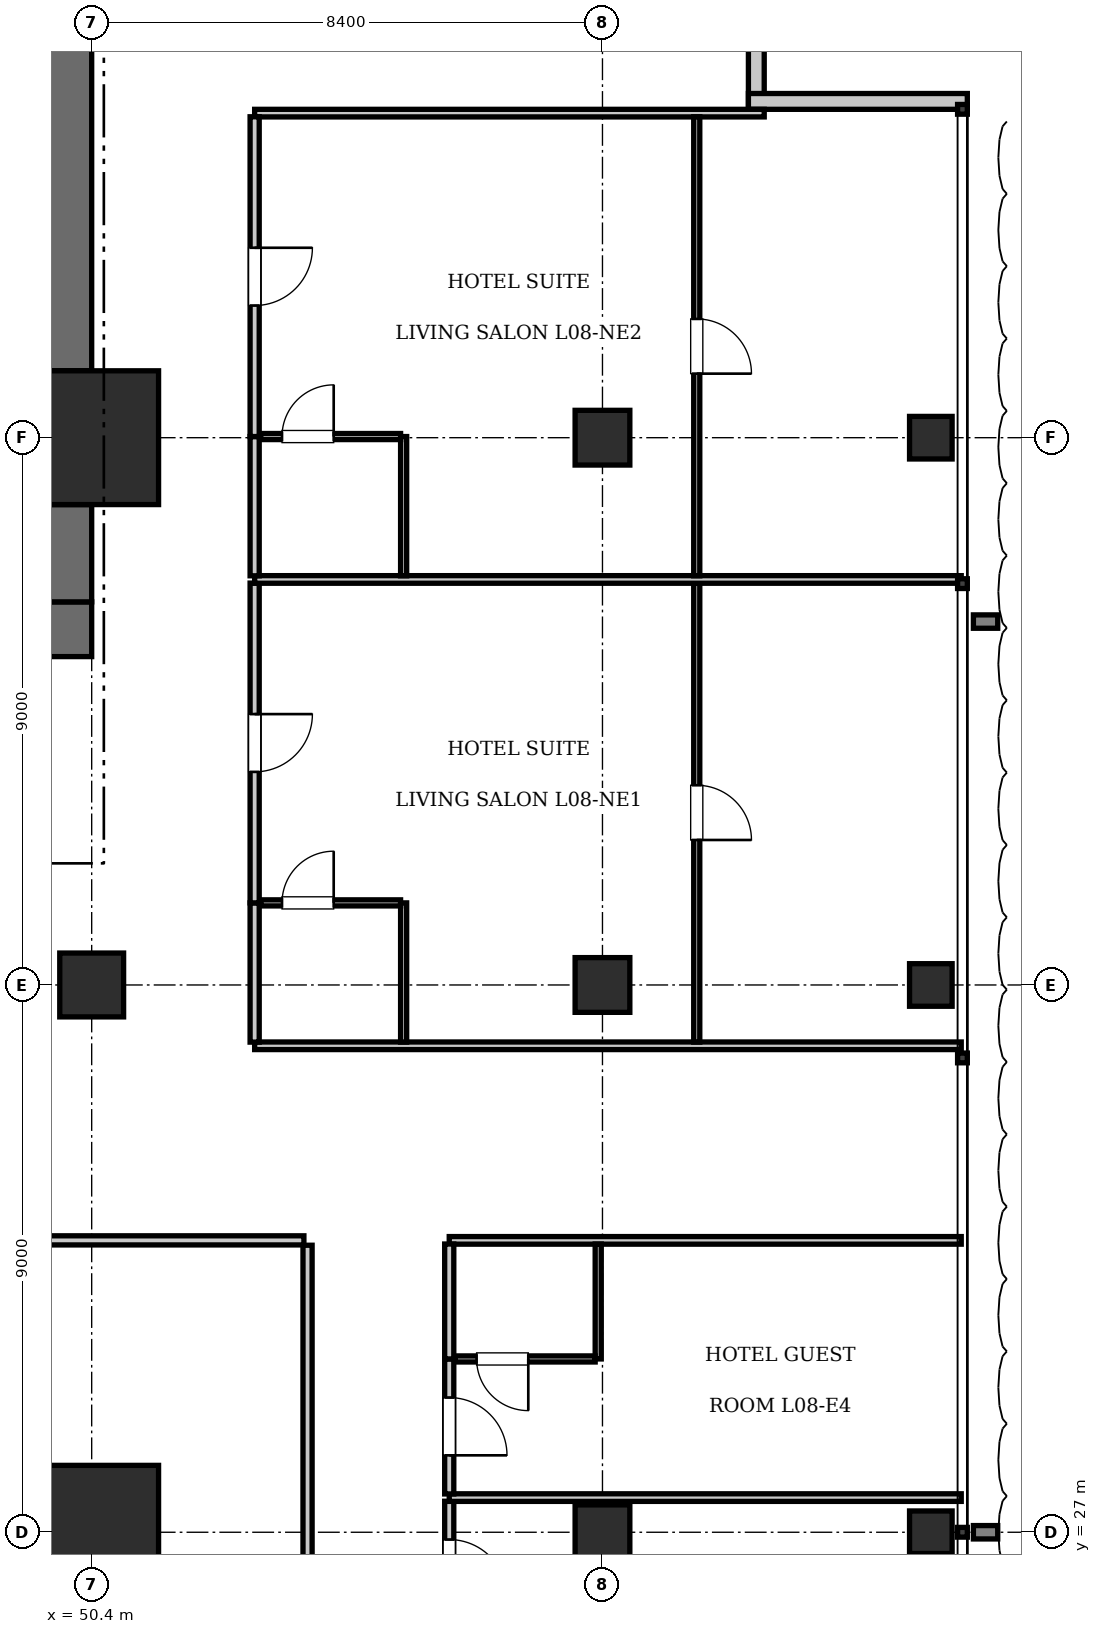
"""IFC4 building model, lengths in metres.
Left out: names, types, materials, properties, quantities, classifications, styles, units other than length and angle.
Written with IfcOpenShell. Run it as: python <this file> out.ifc"""

import sys

from ifc_helpers import new_model, si_unit, direction, frame, frame_2d, origin, origin_2d, place, context, subcontext, project, spatial, rectangle, i_section, extrude, element, fill, save


model = new_model("IFC4")
c1 = context("Model", 3, precision=1e-05, world=origin(), true_north=direction((0.0, 1.0)))
c2 = subcontext(c1, "Body", "Model", "MODEL_VIEW")
j1 = project(units=[si_unit("LENGTHUNIT", "METRE"), si_unit("PLANEANGLEUNIT", "RADIAN")], contexts=[c1])
p1 = place(None, origin())
s1 = spatial("IfcSite", under=j1, at=p1, CompositionType="ELEMENT")
p2 = place(p1, origin())
s2 = spatial("IfcBuilding", under=s1, at=p2, CompositionType="ELEMENT")
p3 = place(p2, frame((0.0, 0.0, 38.5)))
s3 = spatial("IfcBuildingStorey", under=s2, at=p3, CompositionType="ELEMENT", Elevation=38.5)
for number, where, z_axis, x_axis in (
    (1, (50.4, 27.0, 0.0), (0.0, 0.0, 1.0), (1.0, 0.0, 0.0)),
    (2, (50.4, 45.0, 0.0), (0.0, 0.0, 1.0), (1.0, 0.0, 0.0)),
):
    element("IfcColumn", number, at=place(p3, frame(where, z_axis=z_axis, x_axis=x_axis)), inside=s3, PredefinedType="COLUMN", context=c2, shape_type="SweptSolid", body=[
        extrude(rectangle(XDim=2.2, YDim=2.2, at=origin_2d()), origin(), (0.0, 0.0, 1.0), 3.85),
    ])
p4 = place(p3, frame((43.6, 41.85, 0.0), z_axis=(0.0, 0.0, 1.0), x_axis=(1.0, 0.0, 0.0)))
e3 = element("IfcWall", 3, at=p4, inside=s3, PredefinedType="SHEAR", context=c2, shape_type="SweptSolid", body=[
    extrude(rectangle(XDim=6.8, YDim=0.9, at=frame_2d((3.4, 0.0))), origin(), (0.0, 0.0, 1.0), 3.85),
])
p5 = place(p4, frame((3.9, 0.0, 0.0)))
e4 = element("IfcOpeningElement", 4, at=p5, cuts=e3, PredefinedType="OPENING", context=c2, shape_type="SweptSolid", body=[
    extrude(rectangle(XDim=1.15, YDim=2.15, at=frame_2d((0.575, 1.075))), frame((0.0, 0.46, 0.0), z_axis=(0.0, -1.0, 0.0), x_axis=(1.0, 0.0, 0.0)), (0.0, 0.0, 1.0), 0.92),
])
p6 = place(p4, frame((0.55, 0.0, 0.0)))
e5 = element("IfcOpeningElement", 5, at=p6, cuts=e3, PredefinedType="OPENING", context=c2, shape_type="SweptSolid", body=[
    extrude(rectangle(XDim=1.1, YDim=2.2, at=frame_2d((0.55, 1.1))), frame((0.0, 0.46, 0.0), z_axis=(0.0, -1.0, 0.0), x_axis=(1.0, 0.0, 0.0)), (0.0, 0.0, 1.0), 0.92),
])
p7 = place(p3, frame((49.95, 42.3, 0.0), z_axis=(0.0, 0.0, 1.0), x_axis=(0.0, 1.0, 0.0)))
e6 = element("IfcWall", 6, at=p7, inside=s3, PredefinedType="SHEAR", context=c2, shape_type="SweptSolid", body=[
    extrude(rectangle(XDim=1.6, YDim=0.9, at=frame_2d((0.8, 0.0))), origin(), (0.0, 0.0, 1.0), 3.85),
])
p8 = place(p3, frame((49.95, 46.1, 0.0), z_axis=(0.0, 0.0, 1.0), x_axis=(0.0, 1.0, 0.0)))
e7 = element("IfcWall", 7, at=p8, inside=s3, PredefinedType="SHEAR", context=c2, shape_type="SweptSolid", body=[
    extrude(rectangle(XDim=7.0, YDim=0.9, at=frame_2d((3.5, 0.0))), origin(), (0.0, 0.0, 1.0), 3.85),
])
p9 = place(p3, frame((50.4, 36.0, 0.0), z_axis=(0.0, 0.0, 1.0), x_axis=(1.0, 0.0, 0.0)))
e8 = element("IfcColumn", 8, at=p9, inside=s3, PredefinedType="COLUMN", context=c2, shape_type="SweptSolid", body=[
    extrude(rectangle(XDim=1.05, YDim=1.05, at=origin_2d()), origin(), (0.0, 0.0, 1.0), 3.85),
])
for number, where, z_axis, x_axis in (
    (9, (58.8, 27.0, 0.0), (0.0, 0.0, 1.0), (1.0, 0.0, 0.0)),
    (10, (58.8, 36.0, 0.0), (0.0, 0.0, 1.0), (1.0, 0.0, 0.0)),
    (11, (58.8, 45.0, 0.0), (0.0, 0.0, 1.0), (1.0, 0.0, 0.0)),
):
    element("IfcColumn", number, at=place(p3, frame(where, z_axis=z_axis, x_axis=x_axis)), inside=s3, PredefinedType="COLUMN", context=c2, shape_type="SweptSolid", body=[
        extrude(rectangle(XDim=0.9, YDim=0.9, at=origin_2d()), origin(), (0.0, 0.0, 1.0), 3.85),
    ])
for number, where, z_axis, x_axis in (
    (12, (64.2, 27.0, 0.0), (0.0, 0.0, 1.0), (1.0, 0.0, 0.0)),
    (13, (64.2, 36.0, 0.0), (0.0, 0.0, 1.0), (1.0, 0.0, 0.0)),
    (14, (64.2, 45.0, 0.0), (0.0, 0.0, 1.0), (1.0, 0.0, 0.0)),
):
    element("IfcColumn", number, at=place(p3, frame(where, z_axis=z_axis, x_axis=x_axis)), inside=s3, PredefinedType="COLUMN", context=c2, shape_type="SweptSolid", body=[
        extrude(i_section(OverallWidth=0.7, OverallDepth=0.7, WebThickness=0.028, FlangeThickness=0.044, at=origin_2d()), origin(), (0.0, 0.0, 1.0), 3.85),
    ])
for number, where, z_axis, x_axis in (
    (15, (61.33, 54.0, 0.0), (0.0, 0.0, 1.0), (0.0, -1.0, 0.0)),
    (16, (61.2, 50.53, 0.0), (0.0, 0.0, 1.0), (1.0, 0.0, 0.0)),
):
    element("IfcWall", number, at=place(p3, frame(where, z_axis=z_axis, x_axis=x_axis)), inside=s3, PredefinedType="SOLIDWALL", context=c2, shape_type="SweptSolid", body=[
        extrude(rectangle(XDim=3.6, YDim=0.26, at=frame_2d((1.8, 0.0))), origin(), (0.0, 0.0, 1.0), 3.61),
    ])
p10 = place(p3, frame((53.95, 23.48, 0.0), z_axis=(0.0, 0.0, 1.0), x_axis=(0.0, 1.0, 0.0)))
e17 = element("IfcWall", 17, at=p10, inside=s3, PredefinedType="PARTITIONING", context=c2, shape_type="SweptSolid", body=[
    extrude(rectangle(XDim=8.24, YDim=0.15, at=frame_2d((4.12, 0.0))), origin(), (0.0, 0.0, 1.0), 3.61),
])
p11 = place(p3, frame((42.998, 31.8, 0.0), z_axis=(0.0, 0.0, 1.0), x_axis=(1.0, 0.0, 0.0)))
e18 = element("IfcWall", 18, at=p11, inside=s3, PredefinedType="PARTITIONING", context=c2, shape_type="SweptSolid", body=[
    extrude(rectangle(XDim=10.892, YDim=0.15, at=frame_2d((5.446, 0.0))), origin(), (0.0, 0.0, 1.0), 3.61),
])
p12 = place(p11, frame((4.996, 0.0, 0.0)))
e19 = element("IfcOpeningElement", 19, at=p12, cuts=e18, PredefinedType="OPENING", context=c2, shape_type="SweptSolid", body=[
    extrude(rectangle(XDim=0.9, YDim=2.1, at=frame_2d((0.45, 1.05))), frame((0.0, 0.085, 0.0), z_axis=(0.0, -1.0, 0.0), x_axis=(1.0, 0.0, 0.0)), (0.0, 0.0, 1.0), 0.17),
])
p13 = place(p3, frame((56.28, 31.8, 0.0), z_axis=(0.0, 0.0, 1.0), x_axis=(1.0, 0.0, 0.0)))
e20 = element("IfcWall", 20, at=p13, inside=s3, PredefinedType="PARTITIONING", context=c2, shape_type="SweptSolid", body=[
    extrude(rectangle(XDim=8.42, YDim=0.125, at=frame_2d((4.21, 0.0))), origin(), (0.0, 0.0, 1.0), 3.61),
])
p14 = place(p3, frame((56.28, 25.3, 0.0), z_axis=(0.0, 0.0, 1.0), x_axis=(0.0, 1.0, 0.0)))
e21 = element("IfcWall", 21, at=p14, inside=s3, PredefinedType="PARTITIONING", context=c2, shape_type="SweptSolid", body=[
    extrude(rectangle(XDim=2.21, YDim=0.15, at=frame_2d((1.105, 0.0))), origin(), (0.0, 0.0, 1.0), 3.61),
])
p15 = place(p14, frame((0.63, 0.0, 0.0)))
e22 = element("IfcOpeningElement", 22, at=p15, cuts=e21, PredefinedType="OPENING", context=c2, shape_type="SweptSolid", body=[
    extrude(rectangle(XDim=0.95, YDim=2.15, at=frame_2d((0.475, 1.075))), frame((0.0, 0.085, 0.0), z_axis=(0.0, -1.0, 0.0), x_axis=(1.0, 0.0, 0.0)), (0.0, 0.0, 1.0), 0.17),
])
p16 = place(p3, frame((56.28, 27.57, 0.0), z_axis=(0.0, 0.0, 1.0), x_axis=(1.0, 0.0, 0.0)))
e23 = element("IfcWall", 23, at=p16, inside=s3, PredefinedType="PARTITIONING", context=c2, shape_type="SweptSolid", body=[
    extrude(rectangle(XDim=8.42, YDim=0.125, at=frame_2d((4.21, 0.0))), origin(), (0.0, 0.0, 1.0), 3.61),
])
p17 = place(p3, frame((56.28, 27.63, 0.0), z_axis=(0.0, 0.0, 1.0), x_axis=(0.0, 1.0, 0.0)))
e24 = element("IfcWall", 24, at=p17, inside=s3, PredefinedType="PARTITIONING", context=c2, shape_type="SweptSolid", body=[
    extrude(rectangle(XDim=2.22, YDim=0.15, at=frame_2d((1.11, 0.0))), origin(), (0.0, 0.0, 1.0), 3.61),
])
p18 = place(p17, frame((0.635, 0.0, 0.0)))
e25 = element("IfcOpeningElement", 25, at=p18, cuts=e24, PredefinedType="OPENING", context=c2, shape_type="SweptSolid", body=[
    extrude(rectangle(XDim=0.95, YDim=2.15, at=frame_2d((0.475, 1.075))), frame((0.0, 0.085, 0.0), z_axis=(0.0, -1.0, 0.0), x_axis=(1.0, 0.0, 0.0)), (0.0, 0.0, 1.0), 0.17),
])
p19 = place(p3, frame((56.28, 29.85, 0.0), z_axis=(0.0, 0.0, 1.0), x_axis=(0.0, 1.0, 0.0)))
e26 = element("IfcWall", 26, at=p19, inside=s3, PredefinedType="PARTITIONING", context=c2, shape_type="SweptSolid", body=[
    extrude(rectangle(XDim=1.89, YDim=0.15, at=frame_2d((0.945, 0.0))), origin(), (0.0, 0.0, 1.0), 3.61),
])
p20 = place(p3, frame((58.73, 29.85, 0.0), z_axis=(0.0, 0.0, 1.0), x_axis=(0.0, 1.0, 0.0)))
e27 = element("IfcWall", 27, at=p20, inside=s3, PredefinedType="PARTITIONING", context=c2, shape_type="SweptSolid", body=[
    extrude(rectangle(XDim=1.89, YDim=0.1, at=frame_2d((0.945, 0.0))), origin(), (0.0, 0.0, 1.0), 2.988),
])
p21 = place(p3, frame((56.38, 29.85, 0.0), z_axis=(0.0, 0.0, 1.0), x_axis=(1.0, 0.0, 0.0)))
e28 = element("IfcWall", 28, at=p21, inside=s3, PredefinedType="PARTITIONING", context=c2, shape_type="SweptSolid", body=[
    extrude(rectangle(XDim=2.3, YDim=0.1, at=frame_2d((1.15, 0.0))), origin(), (0.0, 0.0, 1.0), 3.61),
])
p22 = place(p21, frame((0.35, 0.0, 0.0)))
e29 = element("IfcOpeningElement", 29, at=p22, cuts=e28, PredefinedType="OPENING", context=c2, shape_type="SweptSolid", body=[
    extrude(rectangle(XDim=0.85, YDim=2.1, at=frame_2d((0.425, 1.05))), frame((0.0, 0.06, 0.0), z_axis=(0.0, -1.0, 0.0), x_axis=(1.0, 0.0, 0.0)), (0.0, 0.0, 1.0), 0.12),
])
p23 = place(p3, frame((53.08, 35.0, 0.0), z_axis=(0.0, 0.0, 1.0), x_axis=(1.0, 0.0, 0.0)))
e30 = element("IfcWall", 30, at=p23, inside=s3, PredefinedType="PARTITIONING", context=c2, shape_type="SweptSolid", body=[
    extrude(rectangle(XDim=11.62, YDim=0.125, at=frame_2d((5.81, 0.0))), origin(), (0.0, 0.0, 1.0), 3.61),
])
p24 = place(p3, frame((53.08, 50.337, 0.0), z_axis=(0.0, 0.0, 1.0), x_axis=(1.0, 0.0, 0.0)))
e31 = element("IfcWall", 31, at=p24, inside=s3, PredefinedType="PARTITIONING", context=c2, shape_type="SweptSolid", body=[
    extrude(rectangle(XDim=8.38, YDim=0.125, at=frame_2d((4.19, 0.0))), origin(), (0.0, 0.0, 1.0), 3.61),
])
p25 = place(p3, frame((53.08, 35.06, 0.0), z_axis=(0.0, 0.0, 1.0), x_axis=(0.0, 1.0, 0.0)))
e32 = element("IfcWall", 32, at=p25, inside=s3, PredefinedType="PARTITIONING", context=c2, shape_type="SweptSolid", body=[
    extrude(rectangle(XDim=2.29, YDim=0.15, at=frame_2d((1.145, 0.0))), origin(), (0.0, 0.0, 1.0), 3.61),
])
p26 = place(p3, frame((53.08, 37.35, 0.0), z_axis=(0.0, 0.0, 1.0), x_axis=(0.0, 1.0, 0.0)))
e33 = element("IfcWall", 33, at=p26, inside=s3, PredefinedType="PARTITIONING", context=c2, shape_type="SweptSolid", body=[
    extrude(rectangle(XDim=5.259, YDim=0.15, at=frame_2d((2.629, 0.0))), origin(), (0.0, 0.0, 1.0), 3.61),
])
p27 = place(p26, frame((2.154, 0.0, 0.0)))
e34 = element("IfcOpeningElement", 34, at=p27, cuts=e33, PredefinedType="OPENING", context=c2, shape_type="SweptSolid", body=[
    extrude(rectangle(XDim=0.95, YDim=2.15, at=frame_2d((0.475, 1.075))), frame((0.0, 0.085, 0.0), z_axis=(0.0, -1.0, 0.0), x_axis=(1.0, 0.0, 0.0)), (0.0, 0.0, 1.0), 0.17),
])
p28 = place(p3, frame((55.53, 35.06, 0.0), z_axis=(0.0, 0.0, 1.0), x_axis=(0.0, 1.0, 0.0)))
e35 = element("IfcWall", 35, at=p28, inside=s3, PredefinedType="PARTITIONING", context=c2, shape_type="SweptSolid", body=[
    extrude(rectangle(XDim=2.29, YDim=0.1, at=frame_2d((1.145, 0.0))), origin(), (0.0, 0.0, 1.0), 3.61),
])
p29 = place(p3, frame((53.18, 37.35, 0.0), z_axis=(0.0, 0.0, 1.0), x_axis=(1.0, 0.0, 0.0)))
e36 = element("IfcWall", 36, at=p29, inside=s3, PredefinedType="PARTITIONING", context=c2, shape_type="SweptSolid", body=[
    extrude(rectangle(XDim=2.3, YDim=0.1, at=frame_2d((1.15, 0.0))), origin(), (0.0, 0.0, 1.0), 3.61),
])
p30 = place(p29, frame((0.35, 0.0, 0.0)))
e37 = element("IfcOpeningElement", 37, at=p30, cuts=e36, PredefinedType="OPENING", context=c2, shape_type="SweptSolid", body=[
    extrude(rectangle(XDim=0.85, YDim=2.1, at=frame_2d((0.425, 1.05))), frame((0.0, 0.06, 0.0), z_axis=(0.0, -1.0, 0.0), x_axis=(1.0, 0.0, 0.0)), (0.0, 0.0, 1.0), 0.12),
])
p31 = place(p3, frame((60.35, 35.06, 0.0), z_axis=(0.0, 0.0, 1.0), x_axis=(0.0, 1.0, 0.0)))
e38 = element("IfcWall", 38, at=p31, inside=s3, PredefinedType="PARTITIONING", context=c2, shape_type="SweptSolid", body=[
    extrude(rectangle(XDim=7.549, YDim=0.1, at=frame_2d((3.774, 0.0))), origin(), (0.0, 0.0, 1.0), 3.61),
])
p32 = place(p31, frame((3.324, 0.0, 0.0)))
e39 = element("IfcOpeningElement", 39, at=p32, cuts=e38, PredefinedType="OPENING", context=c2, shape_type="SweptSolid", body=[
    extrude(rectangle(XDim=0.9, YDim=2.1, at=frame_2d((0.45, 1.05))), frame((0.0, 0.06, 0.0), z_axis=(0.0, -1.0, 0.0), x_axis=(1.0, 0.0, 0.0)), (0.0, 0.0, 1.0), 0.12),
])
p33 = place(p3, frame((53.08, 42.669, 0.0), z_axis=(0.0, 0.0, 1.0), x_axis=(1.0, 0.0, 0.0)))
e40 = element("IfcWall", 40, at=p33, inside=s3, PredefinedType="PARTITIONING", context=c2, shape_type="SweptSolid", body=[
    extrude(rectangle(XDim=11.62, YDim=0.125, at=frame_2d((5.81, 0.0))), origin(), (0.0, 0.0, 1.0), 3.61),
])
p34 = place(p3, frame((53.08, 42.729, 0.0), z_axis=(0.0, 0.0, 1.0), x_axis=(0.0, 1.0, 0.0)))
e41 = element("IfcWall", 41, at=p34, inside=s3, PredefinedType="PARTITIONING", context=c2, shape_type="SweptSolid", body=[
    extrude(rectangle(XDim=2.29, YDim=0.15, at=frame_2d((1.145, 0.0))), origin(), (0.0, 0.0, 1.0), 3.61),
])
p35 = place(p3, frame((53.08, 45.019, 0.0), z_axis=(0.0, 0.0, 1.0), x_axis=(0.0, 1.0, 0.0)))
e42 = element("IfcWall", 42, at=p35, inside=s3, PredefinedType="PARTITIONING", context=c2, shape_type="SweptSolid", body=[
    extrude(rectangle(XDim=5.259, YDim=0.15, at=frame_2d((2.629, 0.0))), origin(), (0.0, 0.0, 1.0), 3.61),
])
p36 = place(p35, frame((2.154, 0.0, 0.0)))
e43 = element("IfcOpeningElement", 43, at=p36, cuts=e42, PredefinedType="OPENING", context=c2, shape_type="SweptSolid", body=[
    extrude(rectangle(XDim=0.95, YDim=2.15, at=frame_2d((0.475, 1.075))), frame((0.0, 0.085, 0.0), z_axis=(0.0, -1.0, 0.0), x_axis=(1.0, 0.0, 0.0)), (0.0, 0.0, 1.0), 0.17),
])
p37 = place(p3, frame((55.53, 42.729, 0.0), z_axis=(0.0, 0.0, 1.0), x_axis=(0.0, 1.0, 0.0)))
e44 = element("IfcWall", 44, at=p37, inside=s3, PredefinedType="PARTITIONING", context=c2, shape_type="SweptSolid", body=[
    extrude(rectangle(XDim=2.29, YDim=0.1, at=frame_2d((1.145, 0.0))), origin(), (0.0, 0.0, 1.0), 3.61),
])
p38 = place(p3, frame((53.18, 45.019, 0.0), z_axis=(0.0, 0.0, 1.0), x_axis=(1.0, 0.0, 0.0)))
e45 = element("IfcWall", 45, at=p38, inside=s3, PredefinedType="PARTITIONING", context=c2, shape_type="SweptSolid", body=[
    extrude(rectangle(XDim=2.3, YDim=0.1, at=frame_2d((1.15, 0.0))), origin(), (0.0, 0.0, 1.0), 2.988),
])
p39 = place(p38, frame((0.35, 0.0, 0.0)))
e46 = element("IfcOpeningElement", 46, at=p39, cuts=e45, PredefinedType="OPENING", context=c2, shape_type="SweptSolid", body=[
    extrude(rectangle(XDim=0.85, YDim=2.1, at=frame_2d((0.425, 1.05))), frame((0.0, 0.06, 0.0), z_axis=(0.0, -1.0, 0.0), x_axis=(1.0, 0.0, 0.0)), (0.0, 0.0, 1.0), 0.12),
])
p40 = place(p3, frame((60.35, 42.729, 0.0), z_axis=(0.0, 0.0, 1.0), x_axis=(0.0, 1.0, 0.0)))
e47 = element("IfcWall", 47, at=p40, inside=s3, PredefinedType="PARTITIONING", context=c2, shape_type="SweptSolid", body=[
    extrude(rectangle(XDim=7.549, YDim=0.1, at=frame_2d((3.774, 0.0))), origin(), (0.0, 0.0, 1.0), 3.61),
])
p41 = place(p40, frame((3.324, 0.0, 0.0)))
e48 = element("IfcOpeningElement", 48, at=p41, cuts=e47, PredefinedType="OPENING", context=c2, shape_type="SweptSolid", body=[
    extrude(rectangle(XDim=0.9, YDim=2.1, at=frame_2d((0.45, 1.05))), frame((0.0, 0.06, 0.0), z_axis=(0.0, -1.0, 0.0), x_axis=(1.0, 0.0, 0.0)), (0.0, 0.0, 1.0), 0.12),
])
p42 = place(p15, frame((0.95, 0.0, 0.0), z_axis=(0.0, 0.0, 1.0), x_axis=(-1.0, 0.0, 0.0)))
e49 = element("IfcDoor", 49, at=p42, inside=s3, OperationType="SINGLE_SWING_RIGHT", PredefinedType="DOOR", context=c2, shape_type="SweptSolid", body=[
    extrude(rectangle(XDim=0.95, YDim=2.15, at=frame_2d((0.475, 1.075))), frame((0.0, 0.025, 0.0), z_axis=(0.0, -1.0, 0.0), x_axis=(1.0, 0.0, 0.0)), (0.0, 0.0, 1.0), 0.05),
])
fill(e22, e49)
p43 = place(p22, frame((0.85, 0.0, 0.0), z_axis=(0.0, 0.0, 1.0), x_axis=(-1.0, 0.0, 0.0)))
e50 = element("IfcDoor", 50, at=p43, inside=s3, OperationType="SINGLE_SWING_LEFT", PredefinedType="DOOR", context=c2, shape_type="SweptSolid", body=[
    extrude(rectangle(XDim=0.85, YDim=2.1, at=frame_2d((0.425, 1.05))), frame((0.0, 0.025, 0.0), z_axis=(0.0, -1.0, 0.0), x_axis=(1.0, 0.0, 0.0)), (0.0, 0.0, 1.0), 0.05),
])
fill(e29, e50)
p44 = place(p18, frame((0.95, 0.0, 0.0), z_axis=(0.0, 0.0, 1.0), x_axis=(-1.0, 0.0, 0.0)))
e51 = element("IfcDoor", 51, at=p44, inside=s3, OperationType="SINGLE_SWING_RIGHT", PredefinedType="DOOR", context=c2, shape_type="SweptSolid", body=[
    extrude(rectangle(XDim=0.95, YDim=2.15, at=frame_2d((0.475, 1.075))), frame((0.0, 0.025, 0.0), z_axis=(0.0, -1.0, 0.0), x_axis=(1.0, 0.0, 0.0)), (0.0, 0.0, 1.0), 0.05),
])
fill(e25, e51)
p45 = place(p30, origin())
e52 = element("IfcDoor", 52, at=p45, inside=s3, OperationType="SINGLE_SWING_RIGHT", PredefinedType="DOOR", context=c2, shape_type="SweptSolid", body=[
    extrude(rectangle(XDim=0.85, YDim=2.1, at=frame_2d((0.425, 1.05))), frame((0.0, 0.025, 0.0), z_axis=(0.0, -1.0, 0.0), x_axis=(1.0, 0.0, 0.0)), (0.0, 0.0, 1.0), 0.05),
])
fill(e37, e52)
p46 = place(p27, frame((0.95, 0.0, 0.0), z_axis=(0.0, 0.0, 1.0), x_axis=(-1.0, 0.0, 0.0)))
e53 = element("IfcDoor", 53, at=p46, inside=s3, OperationType="SINGLE_SWING_LEFT", PredefinedType="DOOR", context=c2, shape_type="SweptSolid", body=[
    extrude(rectangle(XDim=0.95, YDim=2.15, at=frame_2d((0.475, 1.075))), frame((0.0, 0.025, 0.0), z_axis=(0.0, -1.0, 0.0), x_axis=(1.0, 0.0, 0.0)), (0.0, 0.0, 1.0), 0.05),
])
fill(e34, e53)
p47 = place(p32, frame((0.9, 0.0, 0.0), z_axis=(0.0, 0.0, 1.0), x_axis=(-1.0, 0.0, 0.0)))
e54 = element("IfcDoor", 54, at=p47, inside=s3, OperationType="SINGLE_SWING_RIGHT", PredefinedType="DOOR", context=c2, shape_type="SweptSolid", body=[
    extrude(rectangle(XDim=0.9, YDim=2.1, at=frame_2d((0.45, 1.05))), frame((0.0, 0.025, 0.0), z_axis=(0.0, -1.0, 0.0), x_axis=(1.0, 0.0, 0.0)), (0.0, 0.0, 1.0), 0.05),
])
fill(e39, e54)
p48 = place(p39, origin())
e55 = element("IfcDoor", 55, at=p48, inside=s3, OperationType="SINGLE_SWING_RIGHT", PredefinedType="DOOR", context=c2, shape_type="SweptSolid", body=[
    extrude(rectangle(XDim=0.85, YDim=2.1, at=frame_2d((0.425, 1.05))), frame((0.0, 0.025, 0.0), z_axis=(0.0, -1.0, 0.0), x_axis=(1.0, 0.0, 0.0)), (0.0, 0.0, 1.0), 0.05),
])
fill(e46, e55)
p49 = place(p36, frame((0.95, 0.0, 0.0), z_axis=(0.0, 0.0, 1.0), x_axis=(-1.0, 0.0, 0.0)))
e56 = element("IfcDoor", 56, at=p49, inside=s3, OperationType="SINGLE_SWING_LEFT", PredefinedType="DOOR", context=c2, shape_type="SweptSolid", body=[
    extrude(rectangle(XDim=0.95, YDim=2.15, at=frame_2d((0.475, 1.075))), frame((0.0, 0.025, 0.0), z_axis=(0.0, -1.0, 0.0), x_axis=(1.0, 0.0, 0.0)), (0.0, 0.0, 1.0), 0.05),
])
fill(e43, e56)
p50 = place(p41, frame((0.9, 0.0, 0.0), z_axis=(0.0, 0.0, 1.0), x_axis=(-1.0, 0.0, 0.0)))
e57 = element("IfcDoor", 57, at=p50, inside=s3, OperationType="SINGLE_SWING_RIGHT", PredefinedType="DOOR", context=c2, shape_type="SweptSolid", body=[
    extrude(rectangle(XDim=0.9, YDim=2.1, at=frame_2d((0.45, 1.05))), frame((0.0, 0.025, 0.0), z_axis=(0.0, -1.0, 0.0), x_axis=(1.0, 0.0, 0.0)), (0.0, 0.0, 1.0), 0.05),
])
fill(e48, e57)
save(model, sys.argv[1])
